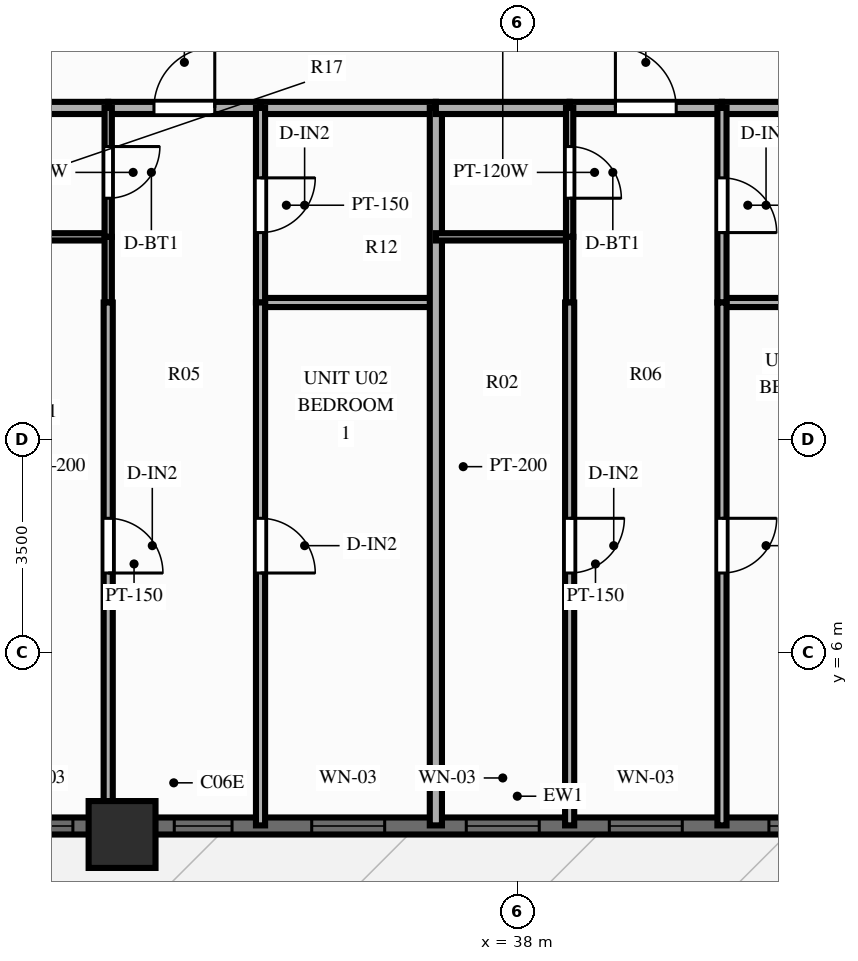
"""IFC4 building model, lengths in metres.
Left out: names, types, materials, properties, quantities, classifications, styles, units other than length and angle.
Written with IfcOpenShell. Run it as: python <this file> out.ifc"""

import sys

from ifc_helpers import new_model, si_unit, direction, frame, frame_2d, origin, origin_2d, place, context, subcontext, project, spatial, rectangle, extrude, source, transform, mapped, element, fill, save


model = new_model("IFC4")
c1 = context("Model", 3, precision=1e-05, world=origin(), true_north=direction((0.0, 1.0)))
c2 = subcontext(c1, "Body", "Model", "MODEL_VIEW")
j1 = project(units=[si_unit("LENGTHUNIT", "METRE"), si_unit("PLANEANGLEUNIT", "RADIAN")], contexts=[c1])
p1 = place(None, origin())
s1 = spatial("IfcSite", under=j1, at=p1, CompositionType="ELEMENT")
p2 = place(p1, origin())
s2 = spatial("IfcBuilding", under=s1, at=p2, CompositionType="ELEMENT")
p3 = place(p2, frame((0.0, 0.0, 61.4)))
s3 = spatial("IfcBuildingStorey", under=s2, at=p3, CompositionType="ELEMENT", Elevation=61.4)
m1 = source(origin(), c2, "Body", "SweptSolid", [
    extrude(rectangle(XDim=1.1, YDim=1.1, at=origin_2d()), origin(), (0.0, 0.0, 1.0), 3.0),
])
p4 = place(p3, frame((31.5, 3.0, 0.0), z_axis=(0.0, 0.0, 1.0), x_axis=(1.0, 0.0, 0.0)))
e1 = element("IfcColumn", 1, at=p4, inside=s3, PredefinedType="COLUMN", context=c2, shape_type="MappedRepresentation", body=[
    mapped(m1, transform((0.0, 0.0, 0.0), scale=1.0)),
])
p5 = place(p3, frame((15.5, 3.14, 0.0), z_axis=(0.0, 0.0, 1.0), x_axis=(1.0, 0.0, 0.0)))
e2 = element("IfcWall", 2, at=p5, inside=s3, PredefinedType="SOLIDWALL", context=c2, shape_type="SweptSolid", body=[
    extrude(rectangle(XDim=45.0, YDim=0.28, at=frame_2d((22.5, 0.0))), origin(), (0.0, 0.0, 1.0), 2.28),
])
p6 = place(p5, frame((1.426, 0.0, 0.25)))
e3 = element("IfcOpeningElement", 3, at=p6, cuts=e2, PredefinedType="OPENING", context=c2, shape_type="SweptSolid", body=[
    extrude(rectangle(XDim=1.2, YDim=1.5, at=frame_2d((0.6, 0.75))), frame((0.0, 0.152, 0.0), z_axis=(0.0, -1.0, 0.0), x_axis=(1.0, 0.0, 0.0)), (0.0, 0.0, 1.0), 0.304),
])
p7 = place(p5, frame((7.278, 0.0, 0.0), z_axis=(0.0, 0.0, 1.0), x_axis=(-1.0, 0.0, 0.0)))
e4 = element("IfcOpeningElement", 4, at=p7, cuts=e2, PredefinedType="OPENING", context=c2, shape_type="SweptSolid", body=[
    extrude(rectangle(XDim=1.1, YDim=2.15, at=frame_2d((0.55, 1.075))), frame((0.0, 0.152, 0.0), z_axis=(0.0, -1.0, 0.0), x_axis=(1.0, 0.0, 0.0)), (0.0, 0.0, 1.0), 0.304),
])
p8 = place(p5, frame((11.083, 0.0, 0.25)))
e5 = element("IfcOpeningElement", 5, at=p8, cuts=e2, PredefinedType="OPENING", context=c2, shape_type="SweptSolid", body=[
    extrude(rectangle(XDim=1.2, YDim=1.5, at=frame_2d((0.6, 0.75))), frame((0.0, 0.152, 0.0), z_axis=(0.0, -1.0, 0.0), x_axis=(1.0, 0.0, 0.0)), (0.0, 0.0, 1.0), 0.304),
])
p9 = place(p5, frame((13.991, 0.0, 0.25)))
e6 = element("IfcOpeningElement", 6, at=p9, cuts=e2, PredefinedType="OPENING", context=c2, shape_type="SweptSolid", body=[
    extrude(rectangle(XDim=1.2, YDim=1.5, at=frame_2d((0.6, 0.75))), frame((0.0, 0.152, 0.0), z_axis=(0.0, -1.0, 0.0), x_axis=(1.0, 0.0, 0.0)), (0.0, 0.0, 1.0), 0.304),
])
p10 = place(p5, frame((16.858, 0.0, 0.25)))
e7 = element("IfcOpeningElement", 7, at=p10, cuts=e2, PredefinedType="OPENING", context=c2, shape_type="SweptSolid", body=[
    extrude(rectangle(XDim=0.95, YDim=1.5, at=frame_2d((0.475, 0.75))), frame((0.0, 0.152, 0.0), z_axis=(0.0, -1.0, 0.0), x_axis=(1.0, 0.0, 0.0)), (0.0, 0.0, 1.0), 0.304),
])
p11 = place(p5, frame((19.119, 0.0, 0.25)))
e8 = element("IfcOpeningElement", 8, at=p11, cuts=e2, PredefinedType="OPENING", context=c2, shape_type="SweptSolid", body=[
    extrude(rectangle(XDim=1.2, YDim=1.5, at=frame_2d((0.6, 0.75))), frame((0.0, 0.152, 0.0), z_axis=(0.0, -1.0, 0.0), x_axis=(1.0, 0.0, 0.0)), (0.0, 0.0, 1.0), 0.304),
])
p12 = place(p5, frame((21.661, 0.0, 0.25)))
e9 = element("IfcOpeningElement", 9, at=p12, cuts=e2, PredefinedType="OPENING", context=c2, shape_type="SweptSolid", body=[
    extrude(rectangle(XDim=1.2, YDim=1.5, at=frame_2d((0.6, 0.75))), frame((0.0, 0.152, 0.0), z_axis=(0.0, -1.0, 0.0), x_axis=(1.0, 0.0, 0.0)), (0.0, 0.0, 1.0), 0.304),
])
p13 = place(p5, frame((24.013, 0.0, 0.25)))
e10 = element("IfcOpeningElement", 10, at=p13, cuts=e2, PredefinedType="OPENING", context=c2, shape_type="SweptSolid", body=[
    extrude(rectangle(XDim=1.2, YDim=1.5, at=frame_2d((0.6, 0.75))), frame((0.0, 0.152, 0.0), z_axis=(0.0, -1.0, 0.0), x_axis=(1.0, 0.0, 0.0)), (0.0, 0.0, 1.0), 0.304),
])
p14 = place(p5, frame((26.638, 0.0, 0.25)))
e11 = element("IfcOpeningElement", 11, at=p14, cuts=e2, PredefinedType="OPENING", context=c2, shape_type="SweptSolid", body=[
    extrude(rectangle(XDim=1.2, YDim=1.5, at=frame_2d((0.6, 0.75))), frame((0.0, 0.152, 0.0), z_axis=(0.0, -1.0, 0.0), x_axis=(1.0, 0.0, 0.0)), (0.0, 0.0, 1.0), 0.304),
])
p15 = place(p5, frame((29.72, 0.0, 0.25)))
e12 = element("IfcOpeningElement", 12, at=p15, cuts=e2, PredefinedType="OPENING", context=c2, shape_type="SweptSolid", body=[
    extrude(rectangle(XDim=0.95, YDim=1.5, at=frame_2d((0.475, 0.75))), frame((0.0, 0.152, 0.0), z_axis=(0.0, -1.0, 0.0), x_axis=(1.0, 0.0, 0.0)), (0.0, 0.0, 1.0), 0.304),
])
p16 = place(p5, frame((31.765, 0.0, 0.25)))
e13 = element("IfcOpeningElement", 13, at=p16, cuts=e2, PredefinedType="OPENING", context=c2, shape_type="SweptSolid", body=[
    extrude(rectangle(XDim=1.2, YDim=1.5, at=frame_2d((0.6, 0.75))), frame((0.0, 0.152, 0.0), z_axis=(0.0, -1.0, 0.0), x_axis=(1.0, 0.0, 0.0)), (0.0, 0.0, 1.0), 0.304),
])
p17 = place(p5, frame((34.658, 0.0, 0.25)))
e14 = element("IfcOpeningElement", 14, at=p17, cuts=e2, PredefinedType="OPENING", context=c2, shape_type="SweptSolid", body=[
    extrude(rectangle(XDim=1.2, YDim=1.5, at=frame_2d((0.6, 0.75))), frame((0.0, 0.152, 0.0), z_axis=(0.0, -1.0, 0.0), x_axis=(1.0, 0.0, 0.0)), (0.0, 0.0, 1.0), 0.304),
])
p18 = place(p5, frame((37.31, 0.0, 0.25)))
e15 = element("IfcOpeningElement", 15, at=p18, cuts=e2, PredefinedType="OPENING", context=c2, shape_type="SweptSolid", body=[
    extrude(rectangle(XDim=1.2, YDim=1.5, at=frame_2d((0.6, 0.75))), frame((0.0, 0.152, 0.0), z_axis=(0.0, -1.0, 0.0), x_axis=(1.0, 0.0, 0.0)), (0.0, 0.0, 1.0), 0.304),
])
p19 = place(p5, frame((39.801, 0.0, 0.25)))
e16 = element("IfcOpeningElement", 16, at=p19, cuts=e2, PredefinedType="OPENING", context=c2, shape_type="SweptSolid", body=[
    extrude(rectangle(XDim=1.2, YDim=1.5, at=frame_2d((0.6, 0.75))), frame((0.0, 0.152, 0.0), z_axis=(0.0, -1.0, 0.0), x_axis=(1.0, 0.0, 0.0)), (0.0, 0.0, 1.0), 0.304),
])
p20 = place(p5, frame((42.588, 0.0, 0.25)))
e17 = element("IfcOpeningElement", 17, at=p20, cuts=e2, PredefinedType="OPENING", context=c2, shape_type="SweptSolid", body=[
    extrude(rectangle(XDim=1.2, YDim=1.5, at=frame_2d((0.6, 0.75))), frame((0.0, 0.152, 0.0), z_axis=(0.0, -1.0, 0.0), x_axis=(1.0, 0.0, 0.0)), (0.0, 0.0, 1.0), 0.304),
])
p21 = place(p3, frame((29.072, 14.95, 0.0), z_axis=(0.0, 0.0, 1.0), x_axis=(1.0, 0.0, 0.0)))
e18 = element("IfcWall", 18, at=p21, inside=s3, PredefinedType="PARTITIONING", context=c2, shape_type="SweptSolid", body=[
    extrude(rectangle(XDim=2.2, YDim=0.2, at=frame_2d((1.1, 0.0))), origin(), (0.0, 0.0, 1.0), 2.79),
])
p22 = place(p3, frame((31.272, 14.95, 0.0), z_axis=(0.0, 0.0, 1.0), x_axis=(1.0, 0.0, 0.0)))
e19 = element("IfcWall", 19, at=p22, inside=s3, PredefinedType="PARTITIONING", context=c2, shape_type="SweptSolid", body=[
    extrude(rectangle(XDim=2.505, YDim=0.2, at=frame_2d((1.252, 0.0))), origin(), (0.0, 0.0, 1.0), 2.79),
])
p23 = place(p22, frame((0.752, 0.0, 0.0)))
e20 = element("IfcOpeningElement", 20, at=p23, cuts=e19, PredefinedType="OPENING", context=c2, shape_type="SweptSolid", body=[
    extrude(rectangle(XDim=1.0, YDim=2.15, at=frame_2d((0.5, 1.075))), frame((0.0, 0.112, 0.0), z_axis=(0.0, -1.0, 0.0), x_axis=(1.0, 0.0, 0.0)), (0.0, 0.0, 1.0), 0.224),
])
p24 = place(p3, frame((33.777, 14.95, 0.0), z_axis=(0.0, 0.0, 1.0), x_axis=(1.0, 0.0, 0.0)))
e21 = element("IfcWall", 21, at=p24, inside=s3, PredefinedType="PARTITIONING", context=c2, shape_type="SweptSolid", body=[
    extrude(rectangle(XDim=2.884, YDim=0.2, at=frame_2d((1.442, 0.0))), origin(), (0.0, 0.0, 1.0), 2.79),
])
p25 = place(p3, frame((29.072, 12.83, 0.0), z_axis=(0.0, 0.0, 1.0), x_axis=(1.0, 0.0, 0.0)))
e22 = element("IfcWall", 22, at=p25, inside=s3, PredefinedType="PARTITIONING", context=c2, shape_type="SweptSolid", body=[
    extrude(rectangle(XDim=2.2, YDim=0.12, at=frame_2d((1.1, 0.0))), origin(), (0.0, 0.0, 1.0), 2.79),
])
p26 = place(p3, frame((33.777, 11.75, 0.0), z_axis=(0.0, 0.0, 1.0), x_axis=(1.0, 0.0, 0.0)))
e23 = element("IfcWall", 23, at=p26, inside=s3, PredefinedType="PARTITIONING", context=c2, shape_type="SweptSolid", body=[
    extrude(rectangle(XDim=2.884, YDim=0.15, at=frame_2d((1.442, 0.0))), origin(), (0.0, 0.0, 1.0), 2.79),
])
p27 = place(p3, frame((31.272, 14.95, 0.0), z_axis=(0.0, 0.0, 1.0), x_axis=(0.0, -1.0, 0.0)))
e24 = element("IfcWall", 24, at=p27, inside=s3, PredefinedType="PARTITIONING", context=c2, shape_type="SweptSolid", body=[
    extrude(rectangle(XDim=2.12, YDim=0.12, at=frame_2d((1.06, 0.0))), origin(), (0.0, 0.0, 1.0), 2.24),
])
p28 = place(p27, frame((0.635, 0.0, 0.0)))
e25 = element("IfcOpeningElement", 25, at=p28, cuts=e24, PredefinedType="OPENING", context=c2, shape_type="SweptSolid", body=[
    extrude(rectangle(XDim=0.85, YDim=2.05, at=frame_2d((0.425, 1.025))), frame((0.0, 0.072, 0.0), z_axis=(0.0, -1.0, 0.0), x_axis=(1.0, 0.0, 0.0)), (0.0, 0.0, 1.0), 0.144),
])
p29 = place(p3, frame((31.272, 12.83, 0.0), z_axis=(0.0, 0.0, 1.0), x_axis=(0.0, -1.0, 0.0)))
e26 = element("IfcWall", 26, at=p29, inside=s3, PredefinedType="PARTITIONING", context=c2, shape_type="SweptSolid", body=[
    extrude(rectangle(XDim=1.08, YDim=0.12, at=frame_2d((0.54, 0.0))), origin(), (0.0, 0.0, 1.0), 2.24),
])
p30 = place(p3, frame((31.272, 11.75, 0.0), z_axis=(0.0, 0.0, 1.0), x_axis=(0.0, -1.0, 0.0)))
e27 = element("IfcWall", 27, at=p30, inside=s3, PredefinedType="PARTITIONING", context=c2, shape_type="SweptSolid", body=[
    extrude(rectangle(XDim=8.6, YDim=0.15, at=frame_2d((4.3, 0.0))), origin(), (0.0, 0.0, 1.0), 2.24),
])
p31 = place(p30, frame((3.549, 0.0, 0.0)))
e28 = element("IfcOpeningElement", 28, at=p31, cuts=e27, PredefinedType="OPENING", context=c2, shape_type="SweptSolid", body=[
    extrude(rectangle(XDim=0.9, YDim=2.1, at=frame_2d((0.45, 1.05))), frame((0.0, 0.087, 0.0), z_axis=(0.0, -1.0, 0.0), x_axis=(1.0, 0.0, 0.0)), (0.0, 0.0, 1.0), 0.174),
])
p32 = place(p3, frame((33.777, 14.95, 0.0), z_axis=(0.0, 0.0, 1.0), x_axis=(0.0, -1.0, 0.0)))
e29 = element("IfcWall", 29, at=p32, inside=s3, PredefinedType="PARTITIONING", context=c2, shape_type="SweptSolid", body=[
    extrude(rectangle(XDim=3.2, YDim=0.15, at=frame_2d((1.6, 0.0))), origin(), (0.0, 0.0, 1.0), 2.79),
])
p33 = place(p32, frame((1.15, 0.0, 0.0)))
e30 = element("IfcOpeningElement", 30, at=p33, cuts=e29, PredefinedType="OPENING", context=c2, shape_type="SweptSolid", body=[
    extrude(rectangle(XDim=0.9, YDim=2.1, at=frame_2d((0.45, 1.05))), frame((0.0, 0.087, 0.0), z_axis=(0.0, -1.0, 0.0), x_axis=(1.0, 0.0, 0.0)), (0.0, 0.0, 1.0), 0.174),
])
p34 = place(p3, frame((33.777, 11.75, 0.0), z_axis=(0.0, 0.0, 1.0), x_axis=(0.0, -1.0, 0.0)))
e31 = element("IfcWall", 31, at=p34, inside=s3, PredefinedType="PARTITIONING", context=c2, shape_type="SweptSolid", body=[
    extrude(rectangle(XDim=8.6, YDim=0.15, at=frame_2d((4.3, 0.0))), origin(), (0.0, 0.0, 1.0), 2.79),
])
p35 = place(p34, frame((3.549, 0.0, 0.0)))
e32 = element("IfcOpeningElement", 32, at=p35, cuts=e31, PredefinedType="OPENING", context=c2, shape_type="SweptSolid", body=[
    extrude(rectangle(XDim=0.9, YDim=2.1, at=frame_2d((0.45, 1.05))), frame((0.0, 0.087, 0.0), z_axis=(0.0, -1.0, 0.0), x_axis=(1.0, 0.0, 0.0)), (0.0, 0.0, 1.0), 0.174),
])
p36 = place(p3, frame((36.661, 14.95, 0.0), z_axis=(0.0, 0.0, 1.0), x_axis=(0.0, -1.0, 0.0)))
e33 = element("IfcWall", 33, at=p36, inside=s3, PredefinedType="PARTITIONING", context=c2, shape_type="SweptSolid", body=[
    extrude(rectangle(XDim=11.8, YDim=0.2, at=frame_2d((5.9, 0.0))), origin(), (0.0, 0.0, 1.0), 2.79),
])
p37 = place(p3, frame((36.661, 14.95, 0.0), z_axis=(0.0, 0.0, 1.0), x_axis=(1.0, 0.0, 0.0)))
e34 = element("IfcWall", 34, at=p37, inside=s3, PredefinedType="PARTITIONING", context=c2, shape_type="SweptSolid", body=[
    extrude(rectangle(XDim=2.2, YDim=0.2, at=frame_2d((1.1, 0.0))), origin(), (0.0, 0.0, 1.0), 2.79),
])
p38 = place(p3, frame((38.861, 14.95, 0.0), z_axis=(0.0, 0.0, 1.0), x_axis=(1.0, 0.0, 0.0)))
e35 = element("IfcWall", 35, at=p38, inside=s3, PredefinedType="PARTITIONING", context=c2, shape_type="SweptSolid", body=[
    extrude(rectangle(XDim=2.505, YDim=0.2, at=frame_2d((1.252, 0.0))), origin(), (0.0, 0.0, 1.0), 2.79),
])
p39 = place(p38, frame((0.753, 0.0, 0.0)))
e36 = element("IfcOpeningElement", 36, at=p39, cuts=e35, PredefinedType="OPENING", context=c2, shape_type="SweptSolid", body=[
    extrude(rectangle(XDim=1.0, YDim=2.15, at=frame_2d((0.5, 1.075))), frame((0.0, 0.112, 0.0), z_axis=(0.0, -1.0, 0.0), x_axis=(1.0, 0.0, 0.0)), (0.0, 0.0, 1.0), 0.224),
])
p40 = place(p3, frame((41.366, 14.95, 0.0), z_axis=(0.0, 0.0, 1.0), x_axis=(1.0, 0.0, 0.0)))
e37 = element("IfcWall", 37, at=p40, inside=s3, PredefinedType="PARTITIONING", context=c2, shape_type="SweptSolid", body=[
    extrude(rectangle(XDim=2.884, YDim=0.2, at=frame_2d((1.442, 0.0))), origin(), (0.0, 0.0, 1.0), 2.79),
])
p41 = place(p3, frame((36.661, 12.83, 0.0), z_axis=(0.0, 0.0, 1.0), x_axis=(1.0, 0.0, 0.0)))
e38 = element("IfcWall", 38, at=p41, inside=s3, PredefinedType="PARTITIONING", context=c2, shape_type="SweptSolid", body=[
    extrude(rectangle(XDim=2.2, YDim=0.12, at=frame_2d((1.1, 0.0))), origin(), (0.0, 0.0, 1.0), 2.79),
])
p42 = place(p3, frame((41.366, 11.75, 0.0), z_axis=(0.0, 0.0, 1.0), x_axis=(1.0, 0.0, 0.0)))
e39 = element("IfcWall", 39, at=p42, inside=s3, PredefinedType="PARTITIONING", context=c2, shape_type="SweptSolid", body=[
    extrude(rectangle(XDim=2.884, YDim=0.15, at=frame_2d((1.442, 0.0))), origin(), (0.0, 0.0, 1.0), 2.79),
])
p43 = place(p3, frame((38.861, 14.95, 0.0), z_axis=(0.0, 0.0, 1.0), x_axis=(0.0, -1.0, 0.0)))
e40 = element("IfcWall", 40, at=p43, inside=s3, PredefinedType="PARTITIONING", context=c2, shape_type="SweptSolid", body=[
    extrude(rectangle(XDim=2.12, YDim=0.12, at=frame_2d((1.06, 0.0))), origin(), (0.0, 0.0, 1.0), 2.79),
])
p44 = place(p43, frame((0.635, 0.0, 0.0)))
e41 = element("IfcOpeningElement", 41, at=p44, cuts=e40, PredefinedType="OPENING", context=c2, shape_type="SweptSolid", body=[
    extrude(rectangle(XDim=0.85, YDim=2.05, at=frame_2d((0.425, 1.025))), frame((0.0, 0.072, 0.0), z_axis=(0.0, -1.0, 0.0), x_axis=(1.0, 0.0, 0.0)), (0.0, 0.0, 1.0), 0.144),
])
p45 = place(p3, frame((38.861, 12.83, 0.0), z_axis=(0.0, 0.0, 1.0), x_axis=(0.0, -1.0, 0.0)))
e42 = element("IfcWall", 42, at=p45, inside=s3, PredefinedType="PARTITIONING", context=c2, shape_type="SweptSolid", body=[
    extrude(rectangle(XDim=1.08, YDim=0.12, at=frame_2d((0.54, 0.0))), origin(), (0.0, 0.0, 1.0), 2.79),
])
p46 = place(p3, frame((38.861, 11.75, 0.0), z_axis=(0.0, 0.0, 1.0), x_axis=(0.0, -1.0, 0.0)))
e43 = element("IfcWall", 43, at=p46, inside=s3, PredefinedType="PARTITIONING", context=c2, shape_type="SweptSolid", body=[
    extrude(rectangle(XDim=8.6, YDim=0.15, at=frame_2d((4.3, 0.0))), origin(), (0.0, 0.0, 1.0), 2.79),
])
p47 = place(p46, frame((3.549, 0.0, 0.0)))
e44 = element("IfcOpeningElement", 44, at=p47, cuts=e43, PredefinedType="OPENING", context=c2, shape_type="SweptSolid", body=[
    extrude(rectangle(XDim=0.9, YDim=2.1, at=frame_2d((0.45, 1.05))), frame((0.0, 0.087, 0.0), z_axis=(0.0, -1.0, 0.0), x_axis=(1.0, 0.0, 0.0)), (0.0, 0.0, 1.0), 0.174),
])
p48 = place(p3, frame((41.366, 14.95, 0.0), z_axis=(0.0, 0.0, 1.0), x_axis=(0.0, -1.0, 0.0)))
e45 = element("IfcWall", 45, at=p48, inside=s3, PredefinedType="PARTITIONING", context=c2, shape_type="SweptSolid", body=[
    extrude(rectangle(XDim=3.2, YDim=0.15, at=frame_2d((1.6, 0.0))), origin(), (0.0, 0.0, 1.0), 2.79),
])
p49 = place(p48, frame((1.15, 0.0, 0.0)))
e46 = element("IfcOpeningElement", 46, at=p49, cuts=e45, PredefinedType="OPENING", context=c2, shape_type="SweptSolid", body=[
    extrude(rectangle(XDim=0.9, YDim=2.1, at=frame_2d((0.45, 1.05))), frame((0.0, 0.087, 0.0), z_axis=(0.0, -1.0, 0.0), x_axis=(1.0, 0.0, 0.0)), (0.0, 0.0, 1.0), 0.174),
])
p50 = place(p3, frame((41.366, 11.75, 0.0), z_axis=(0.0, 0.0, 1.0), x_axis=(0.0, -1.0, 0.0)))
e47 = element("IfcWall", 47, at=p50, inside=s3, PredefinedType="PARTITIONING", context=c2, shape_type="SweptSolid", body=[
    extrude(rectangle(XDim=8.6, YDim=0.15, at=frame_2d((4.3, 0.0))), origin(), (0.0, 0.0, 1.0), 2.79),
])
p51 = place(p50, frame((3.549, 0.0, 0.0)))
e48 = element("IfcOpeningElement", 48, at=p51, cuts=e47, PredefinedType="OPENING", context=c2, shape_type="SweptSolid", body=[
    extrude(rectangle(XDim=0.9, YDim=2.1, at=frame_2d((0.45, 1.05))), frame((0.0, 0.087, 0.0), z_axis=(0.0, -1.0, 0.0), x_axis=(1.0, 0.0, 0.0)), (0.0, 0.0, 1.0), 0.174),
])
m2 = source(origin(), c2, "Body", "SweptSolid", [
    extrude(rectangle(XDim=1.2, YDim=1.5, at=frame_2d((0.6, 0.75))), frame((0.0, 0.03, 0.0), z_axis=(0.0, -1.0, 0.0), x_axis=(1.0, 0.0, 0.0)), (0.0, 0.0, 1.0), 0.06),
])
p52 = place(p9, origin())
e49 = element("IfcWindow", 49, at=p52, inside=s3, PartitioningType="SINGLE_PANEL", PredefinedType="WINDOW", context=c2, shape_type="MappedRepresentation", body=[
    mapped(m2, transform((0.0, 0.0, 0.0), scale=1.0)),
])
fill(e6, e49)
m3 = source(origin(), c2, "Body", "SweptSolid", [
    extrude(rectangle(XDim=0.95, YDim=1.5, at=frame_2d((0.475, 0.75))), frame((0.0, 0.03, 0.0), z_axis=(0.0, -1.0, 0.0), x_axis=(1.0, 0.0, 0.0)), (0.0, 0.0, 1.0), 0.06),
])
p53 = place(p10, origin())
e50 = element("IfcWindow", 50, at=p53, inside=s3, PartitioningType="SINGLE_PANEL", PredefinedType="WINDOW", context=c2, shape_type="MappedRepresentation", body=[
    mapped(m3, transform((0.0, 0.0, 0.0), scale=1.0)),
])
fill(e7, e50)
p54 = place(p11, origin())
e51 = element("IfcWindow", 51, at=p54, inside=s3, PartitioningType="SINGLE_PANEL", PredefinedType="WINDOW", context=c2, shape_type="MappedRepresentation", body=[
    mapped(m2, transform((0.0, 0.0, 0.0), scale=1.0)),
])
fill(e8, e51)
p55 = place(p12, origin())
e52 = element("IfcWindow", 52, at=p55, inside=s3, PartitioningType="SINGLE_PANEL", PredefinedType="WINDOW", context=c2, shape_type="MappedRepresentation", body=[
    mapped(m2, transform((0.0, 0.0, 0.0), scale=1.0)),
])
fill(e9, e52)
p56 = place(p13, origin())
e53 = element("IfcWindow", 53, at=p56, inside=s3, PartitioningType="SINGLE_PANEL", PredefinedType="WINDOW", context=c2, shape_type="MappedRepresentation", body=[
    mapped(m2, transform((0.0, 0.0, 0.0), scale=1.0)),
])
fill(e10, e53)
p57 = place(p14, origin())
e54 = element("IfcWindow", 54, at=p57, inside=s3, PartitioningType="SINGLE_PANEL", PredefinedType="WINDOW", context=c2, shape_type="MappedRepresentation", body=[
    mapped(m2, transform((0.0, 0.0, 0.0), scale=1.0)),
])
fill(e11, e54)
m4 = source(origin(), c2, "Body", "SweptSolid", [
    extrude(rectangle(XDim=1.0, YDim=2.15, at=frame_2d((0.5, 1.075))), frame((0.0, 0.025, 0.0), z_axis=(0.0, -1.0, 0.0), x_axis=(1.0, 0.0, 0.0)), (0.0, 0.0, 1.0), 0.05),
])
p58 = place(p23, origin())
e55 = element("IfcDoor", 55, at=p58, inside=s3, OperationType="SINGLE_SWING_RIGHT", PredefinedType="DOOR", context=c2, shape_type="MappedRepresentation", body=[
    mapped(m4, transform((0.0, 0.0, 0.0), scale=1.0)),
])
fill(e20, e55)
m5 = source(origin(), c2, "Body", "SweptSolid", [
    extrude(rectangle(XDim=0.85, YDim=2.05, at=frame_2d((0.425, 1.025))), frame((0.0, 0.025, 0.0), z_axis=(0.0, -1.0, 0.0), x_axis=(1.0, 0.0, 0.0)), (0.0, 0.0, 1.0), 0.05),
])
p59 = place(p28, origin())
e56 = element("IfcDoor", 56, at=p59, inside=s3, OperationType="SINGLE_SWING_LEFT", PredefinedType="DOOR", context=c2, shape_type="MappedRepresentation", body=[
    mapped(m5, transform((0.0, 0.0, 0.0), scale=1.0)),
])
fill(e25, e56)
m6 = source(origin(), c2, "Body", "SweptSolid", [
    extrude(rectangle(XDim=0.9, YDim=2.1, at=frame_2d((0.45, 1.05))), frame((0.0, 0.025, 0.0), z_axis=(0.0, -1.0, 0.0), x_axis=(1.0, 0.0, 0.0)), (0.0, 0.0, 1.0), 0.05),
])
p60 = place(p31, origin())
e57 = element("IfcDoor", 57, at=p60, inside=s3, OperationType="SINGLE_SWING_RIGHT", PredefinedType="DOOR", context=c2, shape_type="MappedRepresentation", body=[
    mapped(m6, transform((0.0, 0.0, 0.0), scale=1.0)),
])
fill(e28, e57)
p61 = place(p33, origin())
e58 = element("IfcDoor", 58, at=p61, inside=s3, OperationType="SINGLE_SWING_LEFT", PredefinedType="DOOR", context=c2, shape_type="MappedRepresentation", body=[
    mapped(m6, transform((0.0, 0.0, 0.0), scale=1.0)),
])
fill(e30, e58)
p62 = place(p35, origin())
e59 = element("IfcDoor", 59, at=p62, inside=s3, OperationType="SINGLE_SWING_RIGHT", PredefinedType="DOOR", context=c2, shape_type="MappedRepresentation", body=[
    mapped(m6, transform((0.0, 0.0, 0.0), scale=1.0)),
])
fill(e32, e59)
p63 = place(p39, origin())
e60 = element("IfcDoor", 60, at=p63, inside=s3, OperationType="SINGLE_SWING_LEFT", PredefinedType="DOOR", context=c2, shape_type="MappedRepresentation", body=[
    mapped(m4, transform((0.0, 0.0, 0.0), scale=1.0)),
])
fill(e36, e60)
p64 = place(p44, origin())
e61 = element("IfcDoor", 61, at=p64, inside=s3, OperationType="SINGLE_SWING_RIGHT", PredefinedType="DOOR", context=c2, shape_type="MappedRepresentation", body=[
    mapped(m5, transform((0.0, 0.0, 0.0), scale=1.0)),
])
fill(e41, e61)
p65 = place(p47, origin())
e62 = element("IfcDoor", 62, at=p65, inside=s3, OperationType="SINGLE_SWING_LEFT", PredefinedType="DOOR", context=c2, shape_type="MappedRepresentation", body=[
    mapped(m6, transform((0.0, 0.0, 0.0), scale=1.0)),
])
fill(e44, e62)
p66 = place(p49, origin())
e63 = element("IfcDoor", 63, at=p66, inside=s3, OperationType="SINGLE_SWING_RIGHT", PredefinedType="DOOR", context=c2, shape_type="MappedRepresentation", body=[
    mapped(m6, transform((0.0, 0.0, 0.0), scale=1.0)),
])
fill(e46, e63)
p67 = place(p51, origin())
e64 = element("IfcDoor", 64, at=p67, inside=s3, OperationType="SINGLE_SWING_LEFT", PredefinedType="DOOR", context=c2, shape_type="MappedRepresentation", body=[
    mapped(m6, transform((0.0, 0.0, 0.0), scale=1.0)),
])
fill(e48, e64)
save(model, sys.argv[1])
